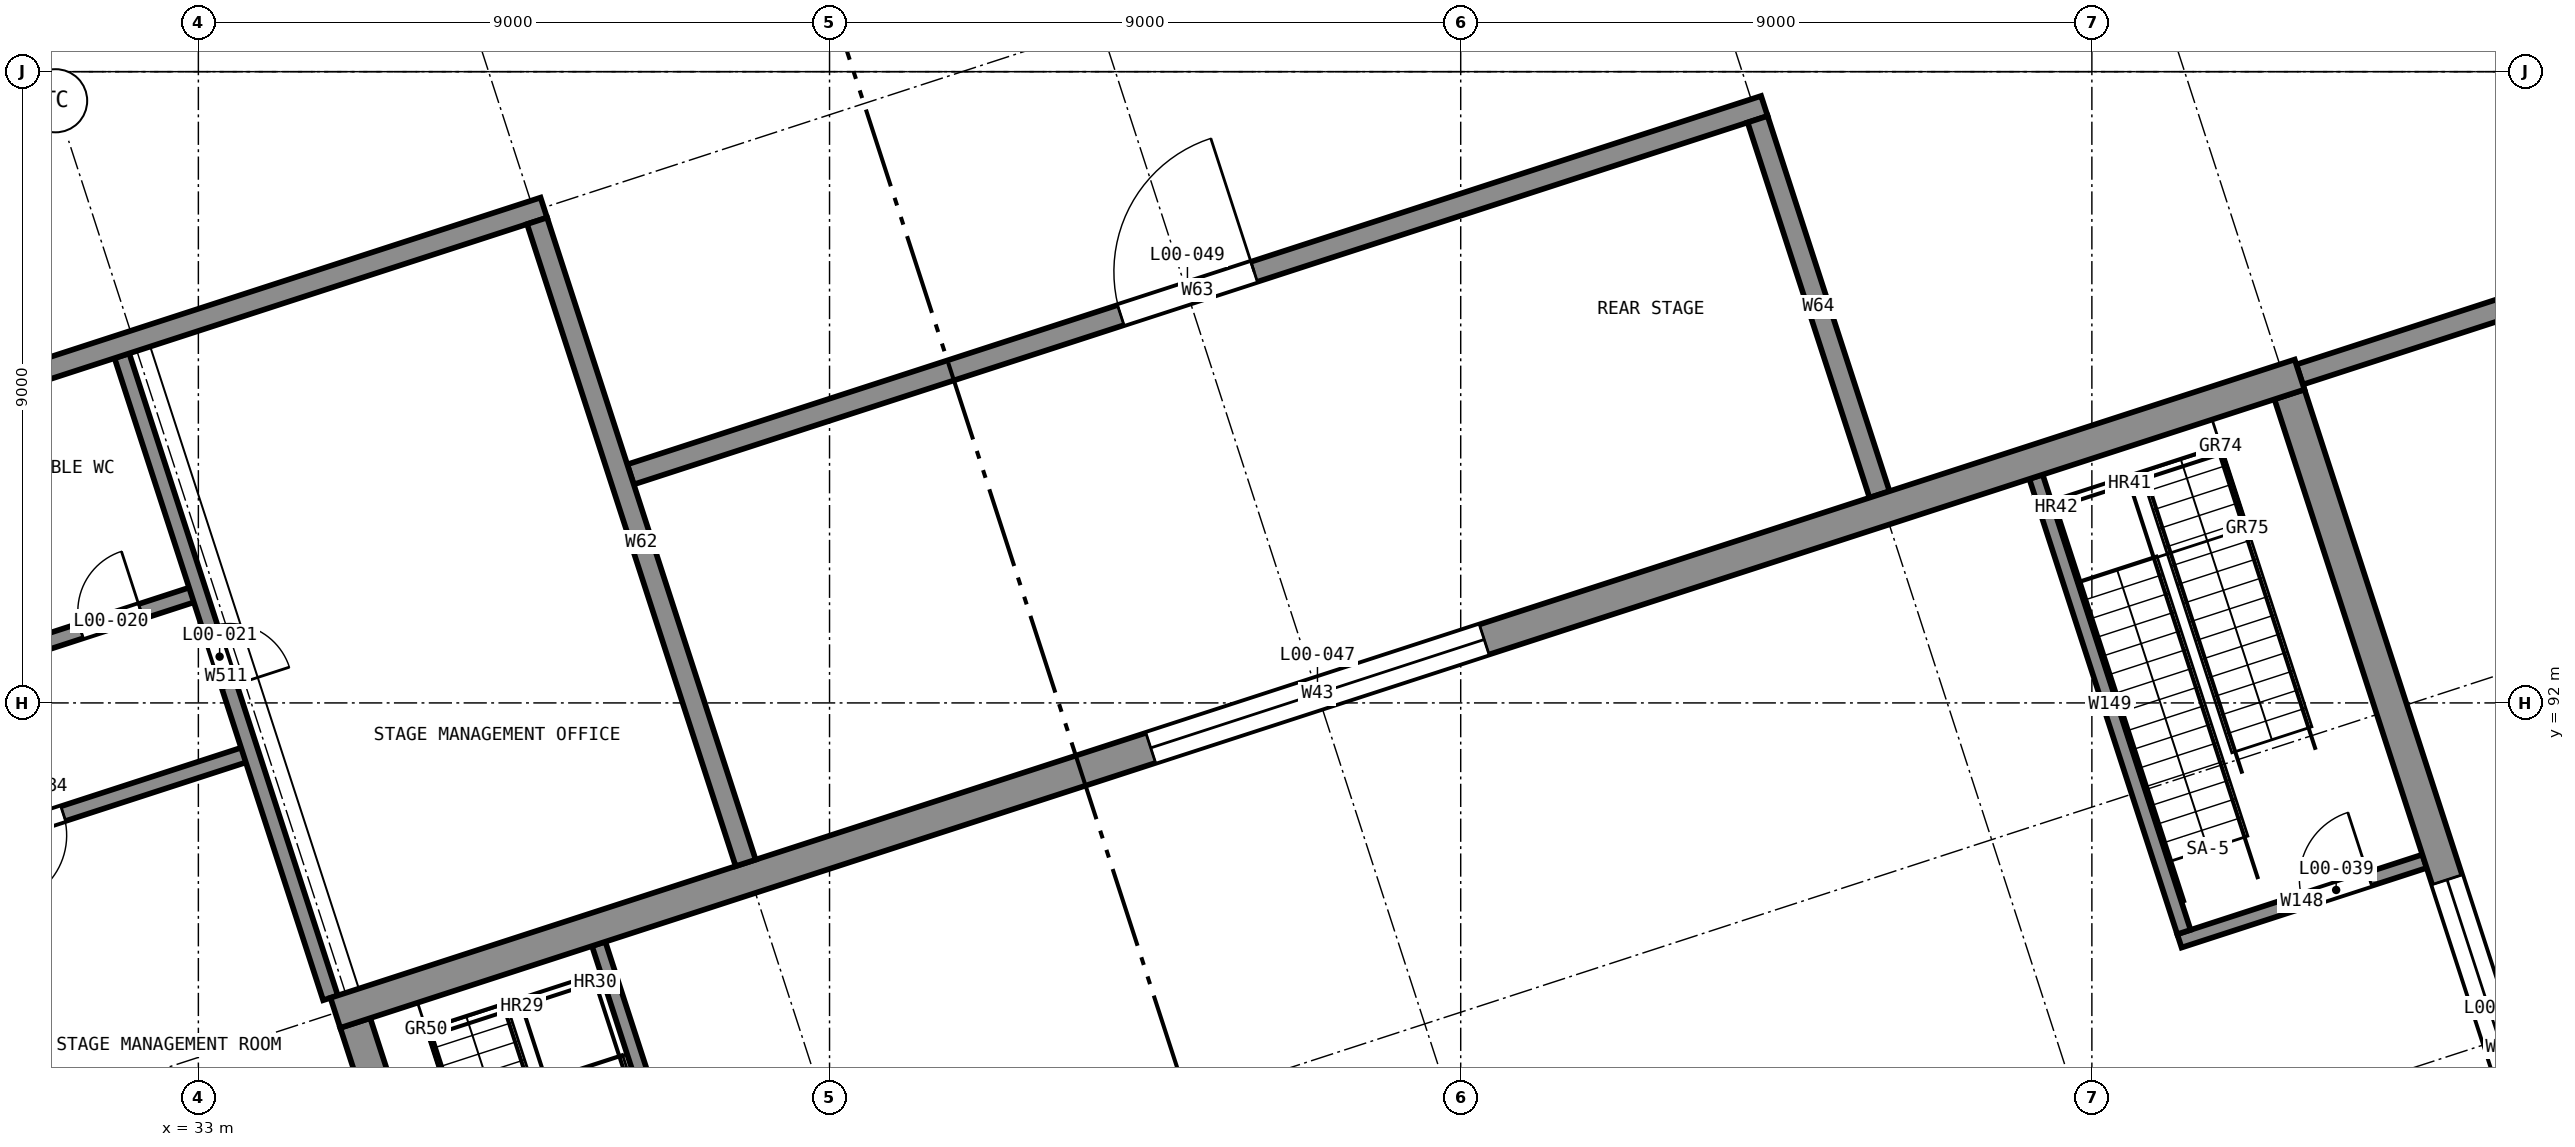
"""IFC4 building model, lengths in metres.
Left out: names, types, materials, properties, quantities, classifications, styles, units other than length and angle.
Written with IfcOpenShell. Run it as: python <this file> out.ifc"""

import sys

from ifc_helpers import new_model, si_unit, direction, frame, frame_2d, origin, place, context, subcontext, project, spatial, rectangle, extrude, element, fill, save


model = new_model("IFC4")
c1 = context("Model", 3, precision=1e-05, world=origin(), true_north=direction((0.0, 1.0)))
c2 = subcontext(c1, "Body", "Model", "MODEL_VIEW")
j1 = project(units=[si_unit("LENGTHUNIT", "METRE"), si_unit("PLANEANGLEUNIT", "RADIAN")], contexts=[c1])
p1 = place(None, origin())
s1 = spatial("IfcSite", under=j1, at=p1, CompositionType="ELEMENT")
p2 = place(p1, origin())
s2 = spatial("IfcBuilding", under=s1, at=p2, CompositionType="ELEMENT")
p3 = place(p2, origin())
s3 = spatial("IfcBuildingStorey", under=s2, at=p3, CompositionType="ELEMENT", Elevation=0.0)
p4 = place(p3, frame((41.286, 68.82, 0.0), z_axis=(0.0, 0.0, 1.0), x_axis=(-0.309008517326, 0.951059270613, 0.0)))
e1 = element("IfcWall", 1, at=p4, inside=s3, PredefinedType="SHEAR", context=c2, shape_type="SweptSolid", body=[
    extrude(rectangle(XDim=19.575, YDim=0.45, at=frame_2d((9.788, 0.0))), origin(), (0.0, 0.0, 1.0), 5.5),
])
p5 = place(p4, frame((7.4, 0.0, 0.0)))
e2 = element("IfcOpeningElement", 2, at=p5, cuts=e1, PredefinedType="OPENING", context=c2, shape_type="SweptSolid", body=[
    extrude(rectangle(XDim=4.8, YDim=4.5, at=frame_2d((2.4, 2.25))), frame((0.0, 0.235, 0.0), z_axis=(0.0, -1.0, 0.0), x_axis=(1.0, 0.0, 0.0)), (0.0, 0.0, 1.0), 0.47),
])
p6 = place(p3, frame((68.866, 77.781, 0.0), z_axis=(0.0, 0.0, 1.0), x_axis=(-0.309019798438, 0.951055605195, 0.0)))
e3 = element("IfcWall", 3, at=p6, inside=s3, PredefinedType="SHEAR", context=c2, shape_type="SweptSolid", body=[
    extrude(rectangle(XDim=19.575, YDim=0.45, at=frame_2d((9.788, 0.0))), origin(), (0.0, 0.0, 1.0), 5.5),
])
p7 = place(p6, frame((7.3, 0.0, 0.0)))
e4 = element("IfcOpeningElement", 4, at=p7, cuts=e3, PredefinedType="OPENING", context=c2, shape_type="SweptSolid", body=[
    extrude(rectangle(XDim=5.0, YDim=4.5, at=frame_2d((2.5, 2.25))), frame((0.0, 0.235, 0.0), z_axis=(0.0, -1.0, 0.0), x_axis=(1.0, 0.0, 0.0)), (0.0, 0.0, 1.0), 0.47),
])
p8 = place(p3, frame((34.953, 87.581, 0.0), z_axis=(0.0, 0.0, 1.0), x_axis=(0.951059165148, 0.309008841924, 0.0)))
e5 = element("IfcWall", 5, at=p8, inside=s3, PredefinedType="SHEAR", context=c2, shape_type="SweptSolid", body=[
    extrude(rectangle(XDim=29.45, YDim=0.45, at=frame_2d((14.725, 0.0))), origin(), (0.0, 0.0, 1.0), 5.5),
])
p9 = place(p8, frame((12.225, 0.0, 0.0)))
e6 = element("IfcOpeningElement", 6, at=p9, cuts=e5, PredefinedType="OPENING", context=c2, shape_type="SweptSolid", body=[
    extrude(rectangle(XDim=5.0, YDim=4.5, at=frame_2d((2.5, 2.25))), frame((0.0, 0.235, 0.0), z_axis=(0.0, -1.0, 0.0), x_axis=(1.0, 0.0, 0.0)), (0.0, 0.0, 1.0), 0.47),
])
p10 = place(p3, frame((33.501, 41.003, 0.0), z_axis=(0.0, 0.0, 1.0), x_axis=(-0.309017194826, 0.951056451165, 0.0)))
e7 = element("IfcWall", 7, at=p10, inside=s3, PredefinedType="SOLIDWALL", context=c2, shape_type="SweptSolid", body=[
    extrude(rectangle(XDim=53.7, YDim=0.3, at=frame_2d((26.85, 0.0))), origin(), (0.0, 0.0, 1.0), 5.5),
])
p11 = place(p10, frame((31.55, 0.0, 0.9)))
e8 = element("IfcOpeningElement", 8, at=p11, cuts=e7, PredefinedType="OPENING", context=c2, shape_type="SweptSolid", body=[
    extrude(rectangle(XDim=3.6, YDim=2.1, at=frame_2d((1.8, 1.05))), frame((0.0, 0.16, 0.0), z_axis=(0.0, -1.0, 0.0), x_axis=(1.0, 0.0, 0.0)), (0.0, 0.0, 1.0), 0.32),
])
p12 = place(p10, frame((3.0, 0.0, 0.0)))
e9 = element("IfcOpeningElement", 9, at=p12, cuts=e7, PredefinedType="OPENING", context=c2, shape_type="SweptSolid", body=[
    extrude(rectangle(XDim=1.1, YDim=2.1, at=frame_2d((0.55, 1.05))), frame((0.0, 0.16, 0.0), z_axis=(0.0, -1.0, 0.0), x_axis=(1.0, 0.0, 0.0)), (0.0, 0.0, 1.0), 0.32),
])
p13 = place(p10, frame((12.6, 0.0, 0.0)))
e10 = element("IfcOpeningElement", 10, at=p13, cuts=e7, PredefinedType="OPENING", context=c2, shape_type="SweptSolid", body=[
    extrude(rectangle(XDim=4.5, YDim=4.5, at=frame_2d((2.25, 2.25))), frame((0.0, 0.16, 0.0), z_axis=(0.0, -1.0, 0.0), x_axis=(1.0, 0.0, 0.0)), (0.0, 0.0, 1.0), 0.32),
])
p14 = place(p10, frame((19.1, 0.0, 0.0)))
e11 = element("IfcOpeningElement", 11, at=p14, cuts=e7, PredefinedType="OPENING", context=c2, shape_type="SweptSolid", body=[
    extrude(rectangle(XDim=4.5, YDim=4.5, at=frame_2d((2.25, 2.25))), frame((0.0, 0.16, 0.0), z_axis=(0.0, -1.0, 0.0), x_axis=(1.0, 0.0, 0.0)), (0.0, 0.0, 1.0), 0.32),
])
p15 = place(p3, frame((16.718, 92.171, 0.0), z_axis=(0.0, 0.0, 1.0), x_axis=(0.951055789165, 0.309019232243, 0.0)))
e12 = element("IfcWall", 12, at=p15, inside=s3, PredefinedType="SOLIDWALL", context=c2, shape_type="SweptSolid", body=[
    extrude(rectangle(XDim=22.3, YDim=0.3, at=frame_2d((11.15, 0.0))), origin(), (0.0, 0.0, 1.0), 5.5),
])
p16 = place(p15, frame((1.65, 0.0, 0.0)))
e13 = element("IfcOpeningElement", 13, at=p16, cuts=e12, PredefinedType="OPENING", context=c2, shape_type="SweptSolid", body=[
    extrude(rectangle(XDim=1.2, YDim=2.1, at=frame_2d((0.6, 1.05))), frame((0.0, 0.16, 0.0), z_axis=(0.0, -1.0, 0.0), x_axis=(1.0, 0.0, 0.0)), (0.0, 0.0, 1.0), 0.32),
])
p17 = place(p3, frame((37.83, 98.873, 0.0), z_axis=(0.0, 0.0, 1.0), x_axis=(0.30902011435, -0.951055502548, 0.0)))
e14 = element("IfcWall", 14, at=p17, inside=s3, PredefinedType="SOLIDWALL", context=c2, shape_type="SweptSolid", body=[
    extrude(rectangle(XDim=9.625, YDim=0.3, at=frame_2d((4.812, 0.0))), origin(), (0.0, 0.0, 1.0), 5.5),
])
p18 = place(p3, frame((39.162, 95.258, 0.0), z_axis=(0.0, 0.0, 1.0), x_axis=(0.951058550479, 0.309010733732, 0.0)))
e15 = element("IfcWall", 15, at=p18, inside=s3, PredefinedType="SOLIDWALL", context=c2, shape_type="SweptSolid", body=[
    extrude(rectangle(XDim=17.0, YDim=0.3, at=frame_2d((8.5, 0.0))), origin(), (0.0, 0.0, 1.0), 5.5),
])
p19 = place(p18, frame((7.35, 0.0, 0.0)))
e16 = element("IfcOpeningElement", 16, at=p19, cuts=e15, PredefinedType="OPENING", context=c2, shape_type="SweptSolid", body=[
    extrude(rectangle(XDim=2.0, YDim=2.4, at=frame_2d((1.0, 1.2))), frame((0.0, 0.16, 0.0), z_axis=(0.0, -1.0, 0.0), x_axis=(1.0, 0.0, 0.0)), (0.0, 0.0, 1.0), 0.32),
])
p20 = place(p3, frame((55.234, 100.322, 0.0), z_axis=(0.0, 0.0, 1.0), x_axis=(0.309031112369, -0.951051928965, 0.0)))
e17 = element("IfcWall", 17, at=p20, inside=s3, PredefinedType="SOLIDWALL", context=c2, shape_type="SweptSolid", body=[
    extrude(rectangle(XDim=5.625, YDim=0.3, at=frame_2d((2.812, 0.0))), origin(), (0.0, 0.0, 1.0), 5.5),
])
p21 = place(p3, frame((71.45, 99.44, 0.0), z_axis=(0.0, 0.0, 1.0), x_axis=(-0.951052360452, -0.309029784452, 0.0)))
e18 = element("IfcWall", 18, at=p21, inside=s3, PredefinedType="SOLIDWALL", context=c2, shape_type="SweptSolid", body=[
    extrude(rectangle(XDim=8.925, YDim=0.3, at=frame_2d((4.462, 0.0))), origin(), (0.0, 0.0, 1.0), 5.5),
])
p22 = place(p3, frame((40.817, 82.074, 0.0), z_axis=(0.0, 0.0, 1.0), x_axis=(-0.309028643499, 0.951052731186, 0.0)))
e19 = element("IfcWall", 19, at=p22, inside=s3, PredefinedType="SOLIDWALL", context=c2, shape_type="SweptSolid", body=[
    extrude(rectangle(XDim=6.825, YDim=0.2, at=frame_2d((3.413, 0.0))), origin(), (0.0, 0.0, 1.0), 5.5),
])
p23 = place(p3, frame((64.743, 89.743, 0.0), z_axis=(0.0, 0.0, 1.0), x_axis=(-0.95104773735, -0.309044011885, 0.0)))
e20 = element("IfcWall", 20, at=p23, inside=s3, PredefinedType="SOLIDWALL", context=c2, shape_type="SweptSolid", body=[
    extrude(rectangle(XDim=3.675, YDim=0.2, at=frame_2d((1.837, 0.0))), origin(), (0.0, 0.0, 1.0), 5.5),
])
p24 = place(p23, frame((0.825, 0.0, 0.0)))
e21 = element("IfcOpeningElement", 21, at=p24, cuts=e20, PredefinedType="OPENING", context=c2, shape_type="SweptSolid", body=[
    extrude(rectangle(XDim=1.0, YDim=2.1, at=frame_2d((0.5, 1.05))), frame((0.0, 0.11, 0.0), z_axis=(0.0, -1.0, 0.0), x_axis=(1.0, 0.0, 0.0)), (0.0, 0.0, 1.0), 0.22),
])
p25 = place(p3, frame((61.312, 88.733, 0.0), z_axis=(0.0, 0.0, 1.0), x_axis=(-0.309028643499, 0.951052731186, 0.0)))
e22 = element("IfcWall", 22, at=p25, inside=s3, PredefinedType="SOLIDWALL", context=c2, shape_type="SweptSolid", body=[
    extrude(rectangle(XDim=6.825, YDim=0.2, at=frame_2d((3.413, 0.0))), origin(), (0.0, 0.0, 1.0), 5.5),
])
p26 = place(p3, frame((37.956, 48.812, 0.0), z_axis=(0.0, 0.0, 1.0), x_axis=(-0.30901736393, 0.951056396219, 0.0)))
e23 = element("IfcWall", 23, at=p26, inside=s3, PredefinedType="SOLIDWALL", context=c2, shape_type="SweptSolid", body=[
    extrude(rectangle(XDim=41.7, YDim=0.22, at=frame_2d((20.85, 0.0))), origin(), (0.0, 0.0, 1.0), 5.2),
])
p27 = place(p26, frame((2.009, 0.0, 0.0)))
e24 = element("IfcOpeningElement", 24, at=p27, cuts=e23, PredefinedType="OPENING", context=c2, shape_type="SweptSolid", body=[
    extrude(rectangle(XDim=1.0, YDim=2.1, at=frame_2d((0.5, 1.05))), frame((0.0, 0.12, 0.0), z_axis=(0.0, -1.0, 0.0), x_axis=(1.0, 0.0, 0.0)), (0.0, 0.0, 1.0), 0.24),
])
p28 = place(p26, frame((11.495, 0.0, 0.0)))
e25 = element("IfcOpeningElement", 25, at=p28, cuts=e23, PredefinedType="OPENING", context=c2, shape_type="SweptSolid", body=[
    extrude(rectangle(XDim=1.0, YDim=2.1, at=frame_2d((0.5, 1.05))), frame((0.0, 0.12, 0.0), z_axis=(0.0, -1.0, 0.0), x_axis=(1.0, 0.0, 0.0)), (0.0, 0.0, 1.0), 0.24),
])
p29 = place(p26, frame((21.7, 0.0, 0.0)))
e26 = element("IfcOpeningElement", 26, at=p29, cuts=e23, PredefinedType="OPENING", context=c2, shape_type="SweptSolid", body=[
    extrude(rectangle(XDim=1.2, YDim=2.1, at=frame_2d((0.6, 1.05))), frame((0.0, 0.12, 0.0), z_axis=(0.0, -1.0, 0.0), x_axis=(1.0, 0.0, 0.0)), (0.0, 0.0, 1.0), 0.24),
])
p30 = place(p26, frame((26.7, 0.0, 0.0)))
e27 = element("IfcOpeningElement", 27, at=p30, cuts=e23, PredefinedType="OPENING", context=c2, shape_type="SweptSolid", body=[
    extrude(rectangle(XDim=1.2, YDim=2.1, at=frame_2d((0.6, 1.05))), frame((0.0, 0.12, 0.0), z_axis=(0.0, -1.0, 0.0), x_axis=(1.0, 0.0, 0.0)), (0.0, 0.0, 1.0), 0.24),
])
p31 = place(p26, frame((31.739, 0.0, 0.0)))
e28 = element("IfcOpeningElement", 28, at=p31, cuts=e23, PredefinedType="OPENING", context=c2, shape_type="SweptSolid", body=[
    extrude(rectangle(XDim=1.2, YDim=2.1, at=frame_2d((0.6, 1.05))), frame((0.0, 0.12, 0.0), z_axis=(0.0, -1.0, 0.0), x_axis=(1.0, 0.0, 0.0)), (0.0, 0.0, 1.0), 0.24),
])
p32 = place(p3, frame((40.333, 49.584, 0.0), z_axis=(0.0, 0.0, 1.0), x_axis=(-0.309015643281, 0.951056955291, 0.0)))
e29 = element("IfcWall", 29, at=p32, inside=s3, PredefinedType="SOLIDWALL", context=c2, shape_type="SweptSolid", body=[
    extrude(rectangle(XDim=41.7, YDim=0.22, at=frame_2d((20.85, 0.0))), origin(), (0.0, 0.0, 1.0), 5.2),
])
p33 = place(p32, frame((1.9, 0.0, 0.0)))
e30 = element("IfcOpeningElement", 30, at=p33, cuts=e29, PredefinedType="OPENING", context=c2, shape_type="SweptSolid", body=[
    extrude(rectangle(XDim=1.2, YDim=2.1, at=frame_2d((0.6, 1.05))), frame((0.0, 0.12, 0.0), z_axis=(0.0, -1.0, 0.0), x_axis=(1.0, 0.0, 0.0)), (0.0, 0.0, 1.0), 0.24),
])
p34 = place(p32, frame((8.185, 0.0, 0.0)))
e31 = element("IfcOpeningElement", 31, at=p34, cuts=e29, PredefinedType="OPENING", context=c2, shape_type="SweptSolid", body=[
    extrude(rectangle(XDim=1.2, YDim=2.1, at=frame_2d((0.6, 1.05))), frame((0.0, 0.12, 0.0), z_axis=(0.0, -1.0, 0.0), x_axis=(1.0, 0.0, 0.0)), (0.0, 0.0, 1.0), 0.24),
])
p35 = place(p32, frame((16.475, 0.0, 0.0)))
e32 = element("IfcOpeningElement", 32, at=p35, cuts=e29, PredefinedType="OPENING", context=c2, shape_type="SweptSolid", body=[
    extrude(rectangle(XDim=1.0, YDim=2.1, at=frame_2d((0.5, 1.05))), frame((0.0, 0.12, 0.0), z_axis=(0.0, -1.0, 0.0), x_axis=(1.0, 0.0, 0.0)), (0.0, 0.0, 1.0), 0.24),
])
p36 = place(p32, frame((23.05, 0.0, 0.0)))
e33 = element("IfcOpeningElement", 33, at=p36, cuts=e29, PredefinedType="OPENING", context=c2, shape_type="SweptSolid", body=[
    extrude(rectangle(XDim=1.0, YDim=2.1, at=frame_2d((0.5, 1.05))), frame((0.0, 0.12, 0.0), z_axis=(0.0, -1.0, 0.0), x_axis=(1.0, 0.0, 0.0)), (0.0, 0.0, 1.0), 0.24),
])
p37 = place(p32, frame((27.3, 0.0, 0.0)))
e34 = element("IfcOpeningElement", 34, at=p37, cuts=e29, PredefinedType="OPENING", context=c2, shape_type="SweptSolid", body=[
    extrude(rectangle(XDim=1.0, YDim=2.1, at=frame_2d((0.5, 1.05))), frame((0.0, 0.12, 0.0), z_axis=(0.0, -1.0, 0.0), x_axis=(1.0, 0.0, 0.0)), (0.0, 0.0, 1.0), 0.24),
])
p38 = place(p32, frame((32.761, 0.0, 0.0)))
e35 = element("IfcOpeningElement", 35, at=p38, cuts=e29, PredefinedType="OPENING", context=c2, shape_type="SweptSolid", body=[
    extrude(rectangle(XDim=1.0, YDim=2.1, at=frame_2d((0.5, 1.05))), frame((0.0, 0.12, 0.0), z_axis=(0.0, -1.0, 0.0), x_axis=(1.0, 0.0, 0.0)), (0.0, 0.0, 1.0), 0.24),
])
p39 = place(p3, frame((27.447, 89.243, 0.0), z_axis=(0.0, 0.0, 1.0), x_axis=(0.951062229373, 0.308999410776, 0.0)))
e36 = element("IfcWall", 36, at=p39, inside=s3, PredefinedType="SOLIDWALL", context=c2, shape_type="SweptSolid", body=[
    extrude(rectangle(XDim=6.625, YDim=0.22, at=frame_2d((3.312, 0.0))), origin(), (0.0, 0.0, 1.0), 5.2),
])
p40 = place(p39, frame((2.812, 0.0, 0.0)))
e37 = element("IfcOpeningElement", 37, at=p40, cuts=e36, PredefinedType="OPENING", context=c2, shape_type="SweptSolid", body=[
    extrude(rectangle(XDim=1.0, YDim=2.1, at=frame_2d((0.5, 1.05))), frame((0.0, 0.12, 0.0), z_axis=(0.0, -1.0, 0.0), x_axis=(1.0, 0.0, 0.0)), (0.0, 0.0, 1.0), 0.24),
])
p41 = place(p3, frame((27.181, 91.68, 0.0), z_axis=(0.0, 0.0, 1.0), x_axis=(0.951063356831, 0.308995940577, 0.0)))
e38 = element("IfcWall", 38, at=p41, inside=s3, PredefinedType="SOLIDWALL", context=c2, shape_type="SweptSolid", body=[
    extrude(rectangle(XDim=6.125, YDim=0.22, at=frame_2d((3.062, 0.0))), origin(), (0.0, 0.0, 1.0), 5.2),
])
p42 = place(p41, frame((1.293, 0.0, 0.0)))
e39 = element("IfcOpeningElement", 39, at=p42, cuts=e38, PredefinedType="OPENING", context=c2, shape_type="SweptSolid", body=[
    extrude(rectangle(XDim=0.9, YDim=2.1, at=frame_2d((0.45, 1.05))), frame((0.0, 0.12, 0.0), z_axis=(0.0, -1.0, 0.0), x_axis=(1.0, 0.0, 0.0)), (0.0, 0.0, 1.0), 0.24),
])
p43 = place(p41, frame((4.357, 0.0, 0.0)))
e40 = element("IfcOpeningElement", 40, at=p43, cuts=e38, PredefinedType="OPENING", context=c2, shape_type="SweptSolid", body=[
    extrude(rectangle(XDim=0.9, YDim=2.1, at=frame_2d((0.45, 1.05))), frame((0.0, 0.12, 0.0), z_axis=(0.0, -1.0, 0.0), x_axis=(1.0, 0.0, 0.0)), (0.0, 0.0, 1.0), 0.24),
])
p44 = place(p3, frame((34.884, 87.795, 0.0), z_axis=(0.0, 0.0, 1.0), x_axis=(-0.309027569133, 0.951053080283, 0.0)))
e41 = element("IfcWall", 41, at=p44, inside=s3, PredefinedType="SOLIDWALL", context=c2, shape_type="SweptSolid", body=[
    extrude(rectangle(XDim=9.625, YDim=0.22, at=frame_2d((4.812, 0.0))), origin(), (0.0, 0.0, 1.0), 5.2),
])
p45 = place(p44, frame((4.665, 0.0, 0.0)))
e42 = element("IfcOpeningElement", 42, at=p45, cuts=e41, PredefinedType="OPENING", context=c2, shape_type="SweptSolid", body=[
    extrude(rectangle(XDim=0.9, YDim=2.1, at=frame_2d((0.45, 1.05))), frame((0.0, 0.12, 0.0), z_axis=(0.0, -1.0, 0.0), x_axis=(1.0, 0.0, 0.0)), (0.0, 0.0, 1.0), 0.24),
])
p46 = place(p43, origin())
e43 = element("IfcDoor", 43, at=p46, inside=s3, OperationType="SINGLE_SWING_LEFT", PredefinedType="DOOR", context=c2, shape_type="SweptSolid", body=[
    extrude(rectangle(XDim=0.9, YDim=2.1, at=frame_2d((0.45, 1.05))), frame((0.0, 0.025, 0.0), z_axis=(0.0, -1.0, 0.0), x_axis=(1.0, 0.0, 0.0)), (0.0, 0.0, 1.0), 0.05),
])
fill(e40, e43)
p47 = place(p45, frame((0.9, 0.0, 0.0), z_axis=(0.0, 0.0, 1.0), x_axis=(-1.0, 0.0, 0.0)))
e44 = element("IfcDoor", 44, at=p47, inside=s3, OperationType="SINGLE_SWING_LEFT", PredefinedType="DOOR", context=c2, shape_type="SweptSolid", body=[
    extrude(rectangle(XDim=0.9, YDim=2.1, at=frame_2d((0.45, 1.05))), frame((0.0, 0.025, 0.0), z_axis=(0.0, -1.0, 0.0), x_axis=(1.0, 0.0, 0.0)), (0.0, 0.0, 1.0), 0.05),
])
fill(e42, e44)
p48 = place(p40, frame((1.0, 0.0, 0.0), z_axis=(0.0, 0.0, 1.0), x_axis=(-1.0, 0.0, 0.0)))
e45 = element("IfcDoor", 45, at=p48, inside=s3, OperationType="SINGLE_SWING_LEFT", PredefinedType="DOOR", context=c2, shape_type="SweptSolid", body=[
    extrude(rectangle(XDim=1.0, YDim=2.1, at=frame_2d((0.5, 1.05))), frame((0.0, 0.025, 0.0), z_axis=(0.0, -1.0, 0.0), x_axis=(1.0, 0.0, 0.0)), (0.0, 0.0, 1.0), 0.05),
])
fill(e37, e45)
p49 = place(p24, frame((1.0, 0.0, 0.0), z_axis=(0.0, 0.0, 1.0), x_axis=(-1.0, 0.0, 0.0)))
e46 = element("IfcDoor", 46, at=p49, inside=s3, OperationType="SINGLE_SWING_LEFT", PredefinedType="DOOR", context=c2, shape_type="SweptSolid", body=[
    extrude(rectangle(XDim=1.0, YDim=2.1, at=frame_2d((0.5, 1.05))), frame((0.0, 0.025, 0.0), z_axis=(0.0, -1.0, 0.0), x_axis=(1.0, 0.0, 0.0)), (0.0, 0.0, 1.0), 0.05),
])
fill(e21, e46)
p50 = place(p7, origin())
e47 = element("IfcDoor", 47, at=p50, inside=s3, OperationType="SLIDING_TO_LEFT", PredefinedType="DOOR", context=c2, shape_type="SweptSolid", body=[
    extrude(rectangle(XDim=5.0, YDim=4.5, at=frame_2d((2.5, 2.25))), frame((0.0, 0.025, 0.0), z_axis=(0.0, -1.0, 0.0), x_axis=(1.0, 0.0, 0.0)), (0.0, 0.0, 1.0), 0.05),
])
fill(e4, e47)
p51 = place(p9, origin())
e48 = element("IfcDoor", 48, at=p51, inside=s3, OperationType="SLIDING_TO_LEFT", PredefinedType="DOOR", context=c2, shape_type="SweptSolid", body=[
    extrude(rectangle(XDim=5.0, YDim=4.5, at=frame_2d((2.5, 2.25))), frame((0.0, 0.025, 0.0), z_axis=(0.0, -1.0, 0.0), x_axis=(1.0, 0.0, 0.0)), (0.0, 0.0, 1.0), 0.05),
])
fill(e6, e48)
p52 = place(p19, origin())
e49 = element("IfcDoor", 49, at=p52, inside=s3, OperationType="DOUBLE_DOOR_SINGLE_SWING", PredefinedType="DOOR", context=c2, shape_type="SweptSolid", body=[
    extrude(rectangle(XDim=2.0, YDim=2.4, at=frame_2d((1.0, 1.2))), frame((0.0, 0.025, 0.0), z_axis=(0.0, -1.0, 0.0), x_axis=(1.0, 0.0, 0.0)), (0.0, 0.0, 1.0), 0.05),
])
fill(e16, e49)
save(model, sys.argv[1])
